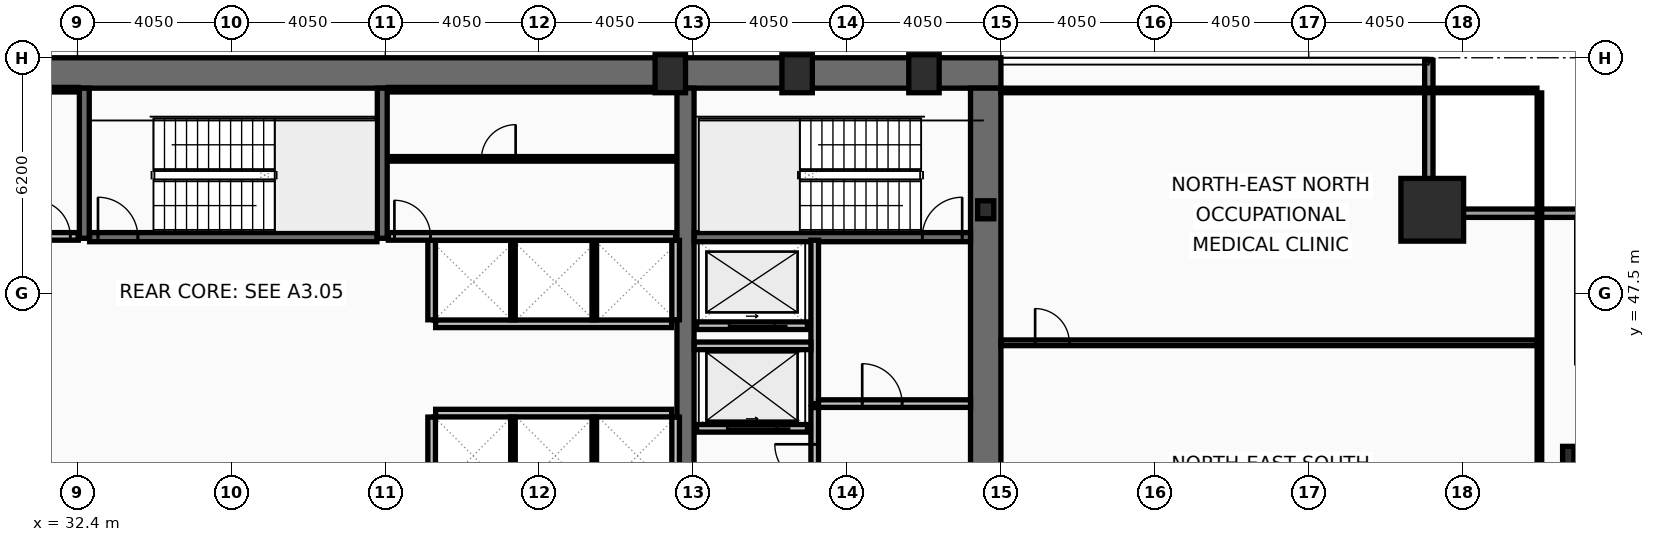
"""IFC4 building model, lengths in metres.
Left out: names, types, materials, properties, quantities, classifications, styles, units other than length and angle.
Written with IfcOpenShell. Run it as: python <this file> out.ifc"""

import sys

from ifc_helpers import new_model, si_unit, direction, frame, frame_2d, origin, origin_2d, place, context, subcontext, project, spatial, rectangle, hollow_rectangle, i_section, extrude, element, fill, save


model = new_model("IFC4")
c1 = context("Model", 3, precision=1e-05, world=origin(), true_north=direction((0.0, 1.0)))
c2 = subcontext(c1, "Body", "Model", "MODEL_VIEW")
j1 = project(units=[si_unit("LENGTHUNIT", "METRE"), si_unit("PLANEANGLEUNIT", "RADIAN")], contexts=[c1])
p1 = place(None, origin())
s1 = spatial("IfcSite", under=j1, at=p1, CompositionType="ELEMENT")
p2 = place(p1, origin())
s2 = spatial("IfcBuilding", under=s1, at=p2, CompositionType="ELEMENT")
p3 = place(p2, frame((0.0, 0.0, 69.8)))
s3 = spatial("IfcBuildingStorey", under=s2, at=p3, CompositionType="ELEMENT", Elevation=69.8)
p4 = place(p3, frame((16.2, 53.3, 0.0), z_axis=(0.0, 0.0, 1.0), x_axis=(1.0, 0.0, 0.0)))
e1 = element("IfcWall", 1, at=p4, inside=s3, PredefinedType="SHEAR", context=c2, shape_type="SweptSolid", body=[
    extrude(rectangle(XDim=40.5, YDim=0.8, at=frame_2d((20.25, 0.0))), origin(), (0.0, 0.0, 1.0), 3.82),
])
p5 = place(p3, frame((56.3, 52.9, 0.0), z_axis=(0.0, 0.0, 1.0), x_axis=(0.0, -1.0, 0.0)))
e2 = element("IfcWall", 2, at=p5, inside=s3, PredefinedType="SHEAR", context=c2, shape_type="SweptSolid", body=[
    extrude(rectangle(XDim=10.8, YDim=0.8, at=frame_2d((5.4, 0.0))), origin(), (0.0, 0.0, 1.0), 3.82),
])
p6 = place(p3, frame((48.4, 42.1, 0.0), z_axis=(0.0, 0.0, 1.0), x_axis=(0.0, 1.0, 0.0)))
e3 = element("IfcWall", 3, at=p6, inside=s3, PredefinedType="SHEAR", context=c2, shape_type="SweptSolid", body=[
    extrude(rectangle(XDim=10.8, YDim=0.45, at=frame_2d((5.4, 0.0))), origin(), (0.0, 0.0, 1.0), 3.82),
])
for number, where, z_axis, x_axis in (
    (4, (32.58, 48.95, 0.0), (0.0, 0.0, 1.0), (0.0, 1.0, 0.0)),
    (5, (40.42, 48.95, 0.0), (0.0, 0.0, 1.0), (0.0, 1.0, 0.0)),
):
    element("IfcWall", number, at=place(p3, frame(where, z_axis=z_axis, x_axis=x_axis)), inside=s3, PredefinedType="SHEAR", context=c2, shape_type="SweptSolid", body=[
        extrude(rectangle(XDim=3.95, YDim=0.26, at=frame_2d((1.975, 0.0))), origin(), (0.0, 0.0, 1.0), 3.82),
    ])
p7 = place(p3, frame((48.63, 48.98, 0.0), z_axis=(0.0, 0.0, 1.0), x_axis=(1.0, 0.0, 0.0)))
e6 = element("IfcWall", 6, at=p7, inside=s3, PredefinedType="SHEAR", context=c2, shape_type="SweptSolid", body=[
    extrude(rectangle(XDim=7.27, YDim=0.24, at=frame_2d((3.635, 0.0))), origin(), (0.0, 0.0, 1.0), 3.82),
])
p8 = place(p7, frame((6.0, 0.0, 0.0)))
e7 = element("IfcOpeningElement", 7, at=p8, cuts=e6, PredefinedType="OPENING", context=c2, shape_type="SweptSolid", body=[
    extrude(rectangle(XDim=1.05, YDim=2.15, at=frame_2d((0.525, 1.075))), frame((0.0, 0.13, 0.0), z_axis=(0.0, -1.0, 0.0), x_axis=(1.0, 0.0, 0.0)), (0.0, 0.0, 1.0), 0.26),
])
p9 = place(p3, frame((32.72, 48.98, 0.0), z_axis=(0.0, 0.0, 1.0), x_axis=(1.0, 0.0, 0.0)))
e8 = element("IfcWall", 8, at=p9, inside=s3, PredefinedType="SHEAR", context=c2, shape_type="SweptSolid", body=[
    extrude(rectangle(XDim=7.56, YDim=0.24, at=frame_2d((3.78, 0.0))), origin(), (0.0, 0.0, 1.0), 3.82),
])
p10 = place(p9, frame((0.22, 0.0, 0.0)))
e9 = element("IfcOpeningElement", 9, at=p10, cuts=e8, PredefinedType="OPENING", context=c2, shape_type="SweptSolid", body=[
    extrude(rectangle(XDim=1.05, YDim=2.15, at=frame_2d((0.525, 1.075))), frame((0.0, 0.13, 0.0), z_axis=(0.0, -1.0, 0.0), x_axis=(1.0, 0.0, 0.0)), (0.0, 0.0, 1.0), 0.26),
])
p11 = place(p3, frame((68.05, 49.7, 0.0), z_axis=(0.0, 0.0, 1.0), x_axis=(1.0, 0.0, 0.0)))
e10 = element("IfcColumn", 10, at=p11, inside=s3, PredefinedType="COLUMN", context=c2, shape_type="SweptSolid", body=[
    extrude(hollow_rectangle(XDim=1.65, YDim=1.65, WallThickness=0.075, at=origin_2d()), origin(), (0.0, 0.0, 1.0), 4.0),
])
for number, where, z_axis, x_axis in (
    (11, (48.0, 53.28, 0.0), (0.0, 0.0, 1.0), (1.0, 0.0, 0.0)),
    (12, (51.337, 53.28, 0.0), (0.0, 0.0, 1.0), (1.0, 0.0, 0.0)),
    (13, (54.675, 53.28, 0.0), (0.0, 0.0, 1.0), (1.0, 0.0, 0.0)),
):
    element("IfcColumn", number, at=place(p3, frame(where, z_axis=z_axis, x_axis=x_axis)), inside=s3, PredefinedType="COLUMN", context=c2, shape_type="SweptSolid", body=[
        extrude(hollow_rectangle(XDim=0.8, YDim=1.0, WallThickness=0.055, at=origin_2d()), origin(), (0.0, 0.0, 1.0), 4.0),
    ])
p12 = place(p3, frame((71.63, 43.2, 0.0), z_axis=(0.0, 0.0, 1.0), x_axis=(1.0, 0.0, 0.0)))
e14 = element("IfcColumn", 14, at=p12, inside=s3, PredefinedType="COLUMN", context=c2, shape_type="SweptSolid", body=[
    extrude(i_section(OverallWidth=0.3, OverallDepth=0.55, WebThickness=0.015, FlangeThickness=0.029, at=origin_2d()), origin(), (0.0, 0.0, 1.0), 4.0),
])
p13 = place(p3, frame((56.3, 49.7, 0.0), z_axis=(0.0, 0.0, 1.0), x_axis=(1.0, 0.0, 0.0)))
e15 = element("IfcColumn", 15, at=p13, inside=s3, PredefinedType="COLUMN", context=c2, shape_type="SweptSolid", body=[
    extrude(i_section(OverallWidth=0.424, OverallDepth=0.474, WebThickness=0.048, FlangeThickness=0.077, at=origin_2d()), origin(), (0.0, 0.0, 1.0), 4.0),
])
p14 = place(p3, frame((67.96, 53.63, 0.0), z_axis=(0.0, 0.0, 1.0), x_axis=(0.0, -1.0, 0.0)))
e16 = element("IfcWall", 16, at=p14, inside=s3, PredefinedType="SOLIDWALL", context=c2, shape_type="SweptSolid", body=[
    extrude(rectangle(XDim=3.91, YDim=0.22, at=frame_2d((1.955, 0.0))), origin(), (0.0, 0.0, 1.0), 3.16),
])
p15 = place(p3, frame((67.85, 49.61, 0.0), z_axis=(0.0, 0.0, 1.0), x_axis=(1.0, 0.0, 0.0)))
e17 = element("IfcWall", 17, at=p15, inside=s3, PredefinedType="SOLIDWALL", context=c2, shape_type="SweptSolid", body=[
    extrude(rectangle(XDim=4.22, YDim=0.22, at=frame_2d((2.11, 0.0))), origin(), (0.0, 0.0, 1.0), 3.16),
])
p16 = place(p3, frame((51.61, 43.95, 0.0), z_axis=(0.0, 0.0, 1.0), x_axis=(-1.0, 0.0, 0.0)))
e18 = element("IfcWall", 18, at=p16, inside=s3, PredefinedType="PARTITIONING", context=c2, shape_type="SweptSolid", body=[
    extrude(rectangle(XDim=2.92, YDim=0.2, at=frame_2d((1.46, 0.0))), origin(), (0.0, 0.0, 1.0), 3.82),
])
p17 = place(p16, frame((0.81, 0.0, 0.0)))
e19 = element("IfcOpeningElement", 19, at=p17, cuts=e18, PredefinedType="OPENING", context=c2, shape_type="SweptSolid", body=[
    extrude(rectangle(XDim=1.3, YDim=2.18, at=frame_2d((0.65, 1.09))), frame((0.0, 0.11, 0.0), z_axis=(0.0, -1.0, 0.0), x_axis=(1.0, 0.0, 0.0)), (0.0, 0.0, 1.0), 0.22),
])
p18 = place(p3, frame((51.61, 46.65, 0.0), z_axis=(0.0, 0.0, 1.0), x_axis=(-1.0, 0.0, 0.0)))
e20 = element("IfcWall", 20, at=p18, inside=s3, PredefinedType="PARTITIONING", context=c2, shape_type="SweptSolid", body=[
    extrude(rectangle(XDim=2.92, YDim=0.2, at=frame_2d((1.46, 0.0))), origin(), (0.0, 0.0, 1.0), 3.82),
])
p19 = place(p18, frame((0.86, 0.0, 0.0)))
e21 = element("IfcOpeningElement", 21, at=p19, cuts=e20, PredefinedType="OPENING", context=c2, shape_type="SweptSolid", body=[
    extrude(rectangle(XDim=1.2, YDim=2.18, at=frame_2d((0.6, 1.09))), frame((0.0, 0.11, 0.0), z_axis=(0.0, -1.0, 0.0), x_axis=(1.0, 0.0, 0.0)), (0.0, 0.0, 1.0), 0.22),
])
p20 = place(p3, frame((51.8, 44.6, 0.0), z_axis=(0.0, 0.0, 1.0), x_axis=(0.0, 1.0, 0.0)))
e22 = element("IfcWall", 22, at=p20, inside=s3, PredefinedType="PARTITIONING", context=c2, shape_type="SweptSolid", body=[
    extrude(rectangle(XDim=4.3, YDim=0.2, at=frame_2d((2.15, 0.0))), origin(), (0.0, 0.0, 1.0), 3.82),
])
p21 = place(p3, frame((51.9, 44.6, 0.0), z_axis=(0.0, 0.0, 1.0), x_axis=(1.0, 0.0, 0.0)))
e23 = element("IfcWall", 23, at=p21, inside=s3, PredefinedType="PARTITIONING", context=c2, shape_type="SweptSolid", body=[
    extrude(rectangle(XDim=4.0, YDim=0.2, at=frame_2d((2.0, 0.0))), origin(), (0.0, 0.0, 1.0), 3.82),
])
p22 = place(p21, frame((1.15, 0.0, 0.0)))
e24 = element("IfcOpeningElement", 24, at=p22, cuts=e23, PredefinedType="OPENING", context=c2, shape_type="SweptSolid", body=[
    extrude(rectangle(XDim=1.05, YDim=2.15, at=frame_2d((0.525, 1.075))), frame((0.0, 0.11, 0.0), z_axis=(0.0, -1.0, 0.0), x_axis=(1.0, 0.0, 0.0)), (0.0, 0.0, 1.0), 0.22),
])
p23 = place(p3, frame((48.63, 46.12, 0.0), z_axis=(0.0, 0.0, 1.0), x_axis=(1.0, 0.0, 0.0)))
e25 = element("IfcWall", 25, at=p23, inside=s3, PredefinedType="PARTITIONING", context=c2, shape_type="SweptSolid", body=[
    extrude(rectangle(XDim=3.07, YDim=0.2, at=frame_2d((1.535, 0.0))), origin(), (0.0, 0.0, 1.0), 3.82),
])
p24 = place(p3, frame((51.8, 42.1, 0.0), z_axis=(0.0, 0.0, 1.0), x_axis=(0.0, 1.0, 0.0)))
e26 = element("IfcWall", 26, at=p24, inside=s3, PredefinedType="PARTITIONING", context=c2, shape_type="SweptSolid", body=[
    extrude(rectangle(XDim=2.395, YDim=0.2, at=frame_2d((1.198, 0.0))), origin(), (0.0, 0.0, 1.0), 3.82),
])
p25 = place(p24, frame((0.38, 0.0, 0.0)))
e27 = element("IfcOpeningElement", 27, at=p25, cuts=e26, PredefinedType="OPENING", context=c2, shape_type="SweptSolid", body=[
    extrude(rectangle(XDim=1.05, YDim=2.15, at=frame_2d((0.525, 1.075))), frame((0.0, 0.11, 0.0), z_axis=(0.0, -1.0, 0.0), x_axis=(1.0, 0.0, 0.0)), (0.0, 0.0, 1.0), 0.22),
])
p26 = place(p3, frame((41.825, 46.7, 0.0), z_axis=(0.0, 0.0, 1.0), x_axis=(1.0, 0.0, 0.0)))
e28 = element("IfcWall", 28, at=p26, inside=s3, PredefinedType="PARTITIONING", context=c2, shape_type="SweptSolid", body=[
    extrude(rectangle(XDim=6.21, YDim=0.2, at=frame_2d((3.105, 0.0))), origin(), (0.0, 0.0, 1.0), 3.82),
])
for number, where, z_axis, x_axis in (
    (29, (41.72, 46.805, 0.0), (0.0, 0.0, 1.0), (0.0, 1.0, 0.0)),
    (30, (48.14, 46.805, 0.0), (0.0, 0.0, 1.0), (0.0, 1.0, 0.0)),
):
    element("IfcWall", number, at=place(p3, frame(where, z_axis=z_axis, x_axis=x_axis)), inside=s3, PredefinedType="PARTITIONING", context=c2, shape_type="SweptSolid", body=[
        extrude(rectangle(XDim=2.09, YDim=0.2, at=frame_2d((1.045, 0.0))), origin(), (0.0, 0.0, 1.0), 3.82),
    ])
for number, where, z_axis, x_axis in (
    (31, (43.86, 46.805, 0.0), (0.0, 0.0, 1.0), (0.0, 1.0, 0.0)),
    (32, (46.0, 46.805, 0.0), (0.0, 0.0, 1.0), (0.0, 1.0, 0.0)),
):
    element("IfcWall", number, at=place(p3, frame(where, z_axis=z_axis, x_axis=x_axis)), inside=s3, PredefinedType="PARTITIONING", context=c2, shape_type="SweptSolid", body=[
        extrude(rectangle(XDim=2.09, YDim=0.12, at=frame_2d((1.045, 0.0))), origin(), (0.0, 0.0, 1.0), 3.82),
    ])
p27 = place(p3, frame((41.825, 44.35, 0.0), z_axis=(0.0, 0.0, 1.0), x_axis=(1.0, 0.0, 0.0)))
e33 = element("IfcWall", 33, at=p27, inside=s3, PredefinedType="PARTITIONING", context=c2, shape_type="SweptSolid", body=[
    extrude(rectangle(XDim=6.21, YDim=0.2, at=frame_2d((3.105, 0.0))), origin(), (0.0, 0.0, 1.0), 3.82),
])
for number, where, z_axis, x_axis in (
    (34, (41.72, 42.15, 0.0), (0.0, 0.0, 1.0), (0.0, 1.0, 0.0)),
    (35, (48.14, 42.15, 0.0), (0.0, 0.0, 1.0), (0.0, 1.0, 0.0)),
):
    element("IfcWall", number, at=place(p3, frame(where, z_axis=z_axis, x_axis=x_axis)), inside=s3, PredefinedType="PARTITIONING", context=c2, shape_type="SweptSolid", body=[
        extrude(rectangle(XDim=2.095, YDim=0.2, at=frame_2d((1.048, 0.0))), origin(), (0.0, 0.0, 1.0), 3.82),
    ])
for number, where, z_axis, x_axis in (
    (36, (43.86, 42.15, 0.0), (0.0, 0.0, 1.0), (0.0, 1.0, 0.0)),
    (37, (46.0, 42.15, 0.0), (0.0, 0.0, 1.0), (0.0, 1.0, 0.0)),
):
    element("IfcWall", number, at=place(p3, frame(where, z_axis=z_axis, x_axis=x_axis)), inside=s3, PredefinedType="PARTITIONING", context=c2, shape_type="SweptSolid", body=[
        extrude(rectangle(XDim=2.095, YDim=0.12, at=frame_2d((1.048, 0.0))), origin(), (0.0, 0.0, 1.0), 3.82),
    ])
p28 = place(p3, frame((24.7, 52.86, 0.0), z_axis=(0.0, 0.0, 1.0), x_axis=(1.0, 0.0, 0.0)))
e38 = element("IfcWall", 38, at=p28, inside=s3, PredefinedType="PARTITIONING", context=c2, shape_type="SweptSolid", body=[
    extrude(rectangle(XDim=7.72, YDim=0.12, at=frame_2d((3.86, 0.0))), origin(), (0.0, 0.0, 1.0), 3.82),
])
p29 = place(p3, frame((24.7, 49.0, 0.0), z_axis=(0.0, 0.0, 1.0), x_axis=(1.0, 0.0, 0.0)))
e39 = element("IfcWall", 39, at=p29, inside=s3, PredefinedType="PARTITIONING", context=c2, shape_type="SweptSolid", body=[
    extrude(rectangle(XDim=7.72, YDim=0.2, at=frame_2d((3.86, 0.0))), origin(), (0.0, 0.0, 1.0), 3.82),
])
p30 = place(p29, frame((6.56, 0.0, 0.0)))
e40 = element("IfcOpeningElement", 40, at=p30, cuts=e39, PredefinedType="OPENING", context=c2, shape_type="SweptSolid", body=[
    extrude(rectangle(XDim=0.95, YDim=2.1, at=frame_2d((0.475, 1.05))), frame((0.0, 0.11, 0.0), z_axis=(0.0, -1.0, 0.0), x_axis=(1.0, 0.0, 0.0)), (0.0, 0.0, 1.0), 0.22),
])
p31 = place(p3, frame((40.58, 52.86, 0.0), z_axis=(0.0, 0.0, 1.0), x_axis=(1.0, 0.0, 0.0)))
e41 = element("IfcWall", 41, at=p31, inside=s3, PredefinedType="PARTITIONING", context=c2, shape_type="SweptSolid", body=[
    extrude(rectangle(XDim=7.56, YDim=0.12, at=frame_2d((3.78, 0.0))), origin(), (0.0, 0.0, 1.0), 3.82),
])
p32 = place(p3, frame((40.58, 49.0, 0.0), z_axis=(0.0, 0.0, 1.0), x_axis=(1.0, 0.0, 0.0)))
e42 = element("IfcWall", 42, at=p32, inside=s3, PredefinedType="PARTITIONING", context=c2, shape_type="SweptSolid", body=[
    extrude(rectangle(XDim=7.56, YDim=0.2, at=frame_2d((3.78, 0.0))), origin(), (0.0, 0.0, 1.0), 3.82),
])
p33 = place(p32, frame((0.16, 0.0, 0.0)))
e43 = element("IfcOpeningElement", 43, at=p33, cuts=e42, PredefinedType="OPENING", context=c2, shape_type="SweptSolid", body=[
    extrude(rectangle(XDim=0.95, YDim=2.1, at=frame_2d((0.475, 1.05))), frame((0.0, 0.11, 0.0), z_axis=(0.0, -1.0, 0.0), x_axis=(1.0, 0.0, 0.0)), (0.0, 0.0, 1.0), 0.22),
])
p34 = place(p3, frame((40.63, 51.04, 0.0), z_axis=(0.0, 0.0, 1.0), x_axis=(1.0, 0.0, 0.0)))
e44 = element("IfcWall", 44, at=p34, inside=s3, PredefinedType="PARTITIONING", context=c2, shape_type="SweptSolid", body=[
    extrude(rectangle(XDim=7.46, YDim=0.12, at=frame_2d((3.73, 0.0))), origin(), (0.0, 0.0, 1.0), 3.82),
])
p35 = place(p34, frame((2.4, 0.0, 0.0)))
e45 = element("IfcOpeningElement", 45, at=p35, cuts=e44, PredefinedType="OPENING", context=c2, shape_type="SweptSolid", body=[
    extrude(rectangle(XDim=0.9, YDim=2.05, at=frame_2d((0.45, 1.025))), frame((0.0, 0.07, 0.0), z_axis=(0.0, -1.0, 0.0), x_axis=(1.0, 0.0, 0.0)), (0.0, 0.0, 1.0), 0.14),
])
p36 = place(p3, frame((56.7, 46.2, 0.0), z_axis=(0.0, 0.0, 1.0), x_axis=(1.0, 0.0, 0.0)))
e46 = element("IfcWall", 46, at=p36, inside=s3, PredefinedType="PARTITIONING", context=c2, shape_type="SweptSolid", body=[
    extrude(rectangle(XDim=14.105, YDim=0.15, at=frame_2d((7.052, 0.0))), origin(), (0.0, 0.0, 1.0), 3.16),
])
p37 = place(p36, frame((0.9, 0.0, 0.0)))
e47 = element("IfcOpeningElement", 47, at=p37, cuts=e46, PredefinedType="OPENING", context=c2, shape_type="SweptSolid", body=[
    extrude(rectangle(XDim=0.9, YDim=2.05, at=frame_2d((0.45, 1.025))), frame((0.0, 0.085, 0.0), z_axis=(0.0, -1.0, 0.0), x_axis=(1.0, 0.0, 0.0)), (0.0, 0.0, 1.0), 0.17),
])
p38 = place(p3, frame((70.87, 10.665, 0.0), z_axis=(0.0, 0.0, 1.0), x_axis=(0.0, 1.0, 0.0)))
e48 = element("IfcWall", 48, at=p38, inside=s3, PredefinedType="PARTITIONING", context=c2, shape_type="SweptSolid", body=[
    extrude(rectangle(XDim=42.11, YDim=0.12, at=frame_2d((21.055, 0.0))), origin(), (0.0, 0.0, 1.0), 3.01),
])
p39 = place(p3, frame((56.7, 52.84, 0.0), z_axis=(0.0, 0.0, 1.0), x_axis=(1.0, 0.0, 0.0)))
e49 = element("IfcWall", 49, at=p39, inside=s3, PredefinedType="PARTITIONING", context=c2, shape_type="SweptSolid", body=[
    extrude(rectangle(XDim=14.105, YDim=0.12, at=frame_2d((7.052, 0.0))), origin(), (0.0, 0.0, 1.0), 3.82),
])
p40 = place(p8, origin())
e50 = element("IfcDoor", 50, at=p40, inside=s3, OperationType="SINGLE_SWING_RIGHT", PredefinedType="DOOR", context=c2, shape_type="SweptSolid", body=[
    extrude(rectangle(XDim=1.05, YDim=2.15, at=frame_2d((0.525, 1.075))), frame((0.0, 0.025, 0.0), z_axis=(0.0, -1.0, 0.0), x_axis=(1.0, 0.0, 0.0)), (0.0, 0.0, 1.0), 0.05),
])
fill(e7, e50)
p41 = place(p10, origin())
e51 = element("IfcDoor", 51, at=p41, inside=s3, OperationType="SINGLE_SWING_LEFT", PredefinedType="DOOR", context=c2, shape_type="SweptSolid", body=[
    extrude(rectangle(XDim=1.05, YDim=2.15, at=frame_2d((0.525, 1.075))), frame((0.0, 0.025, 0.0), z_axis=(0.0, -1.0, 0.0), x_axis=(1.0, 0.0, 0.0)), (0.0, 0.0, 1.0), 0.05),
])
fill(e9, e51)
p42 = place(p17, origin())
e52 = element("IfcDoor", 52, at=p42, inside=s3, OperationType="SLIDING_TO_LEFT", PredefinedType="DOOR", context=c2, shape_type="SweptSolid", body=[
    extrude(rectangle(XDim=1.3, YDim=2.18, at=frame_2d((0.65, 1.09))), frame((0.0, 0.025, 0.0), z_axis=(0.0, -1.0, 0.0), x_axis=(1.0, 0.0, 0.0)), (0.0, 0.0, 1.0), 0.05),
])
fill(e19, e52)
p43 = place(p19, origin())
e53 = element("IfcDoor", 53, at=p43, inside=s3, OperationType="SLIDING_TO_LEFT", PredefinedType="DOOR", context=c2, shape_type="SweptSolid", body=[
    extrude(rectangle(XDim=1.2, YDim=2.18, at=frame_2d((0.6, 1.09))), frame((0.0, 0.025, 0.0), z_axis=(0.0, -1.0, 0.0), x_axis=(1.0, 0.0, 0.0)), (0.0, 0.0, 1.0), 0.05),
])
fill(e21, e53)
p44 = place(p22, origin())
e54 = element("IfcDoor", 54, at=p44, inside=s3, OperationType="SINGLE_SWING_LEFT", PredefinedType="DOOR", context=c2, shape_type="SweptSolid", body=[
    extrude(rectangle(XDim=1.05, YDim=2.15, at=frame_2d((0.525, 1.075))), frame((0.0, 0.025, 0.0), z_axis=(0.0, -1.0, 0.0), x_axis=(1.0, 0.0, 0.0)), (0.0, 0.0, 1.0), 0.05),
])
fill(e24, e54)
p45 = place(p25, origin())
e55 = element("IfcDoor", 55, at=p45, inside=s3, OperationType="SINGLE_SWING_RIGHT", PredefinedType="DOOR", context=c2, shape_type="SweptSolid", body=[
    extrude(rectangle(XDim=1.05, YDim=2.15, at=frame_2d((0.525, 1.075))), frame((0.0, 0.025, 0.0), z_axis=(0.0, -1.0, 0.0), x_axis=(1.0, 0.0, 0.0)), (0.0, 0.0, 1.0), 0.05),
])
fill(e27, e55)
p46 = place(p30, origin())
e56 = element("IfcDoor", 56, at=p46, inside=s3, OperationType="SINGLE_SWING_LEFT", PredefinedType="DOOR", context=c2, shape_type="SweptSolid", body=[
    extrude(rectangle(XDim=0.95, YDim=2.1, at=frame_2d((0.475, 1.05))), frame((0.0, 0.025, 0.0), z_axis=(0.0, -1.0, 0.0), x_axis=(1.0, 0.0, 0.0)), (0.0, 0.0, 1.0), 0.05),
])
fill(e40, e56)
p47 = place(p33, origin())
e57 = element("IfcDoor", 57, at=p47, inside=s3, OperationType="SINGLE_SWING_LEFT", PredefinedType="DOOR", context=c2, shape_type="SweptSolid", body=[
    extrude(rectangle(XDim=0.95, YDim=2.1, at=frame_2d((0.475, 1.05))), frame((0.0, 0.025, 0.0), z_axis=(0.0, -1.0, 0.0), x_axis=(1.0, 0.0, 0.0)), (0.0, 0.0, 1.0), 0.05),
])
fill(e43, e57)
p48 = place(p35, origin())
e58 = element("IfcDoor", 58, at=p48, inside=s3, OperationType="SINGLE_SWING_RIGHT", PredefinedType="DOOR", context=c2, shape_type="SweptSolid", body=[
    extrude(rectangle(XDim=0.9, YDim=2.05, at=frame_2d((0.45, 1.025))), frame((0.0, 0.025, 0.0), z_axis=(0.0, -1.0, 0.0), x_axis=(1.0, 0.0, 0.0)), (0.0, 0.0, 1.0), 0.05),
])
fill(e45, e58)
p49 = place(p37, origin())
e59 = element("IfcDoor", 59, at=p49, inside=s3, OperationType="SINGLE_SWING_LEFT", PredefinedType="DOOR", context=c2, shape_type="SweptSolid", body=[
    extrude(rectangle(XDim=0.9, YDim=2.05, at=frame_2d((0.45, 1.025))), frame((0.0, 0.025, 0.0), z_axis=(0.0, -1.0, 0.0), x_axis=(1.0, 0.0, 0.0)), (0.0, 0.0, 1.0), 0.05),
])
fill(e47, e59)
save(model, sys.argv[1])
